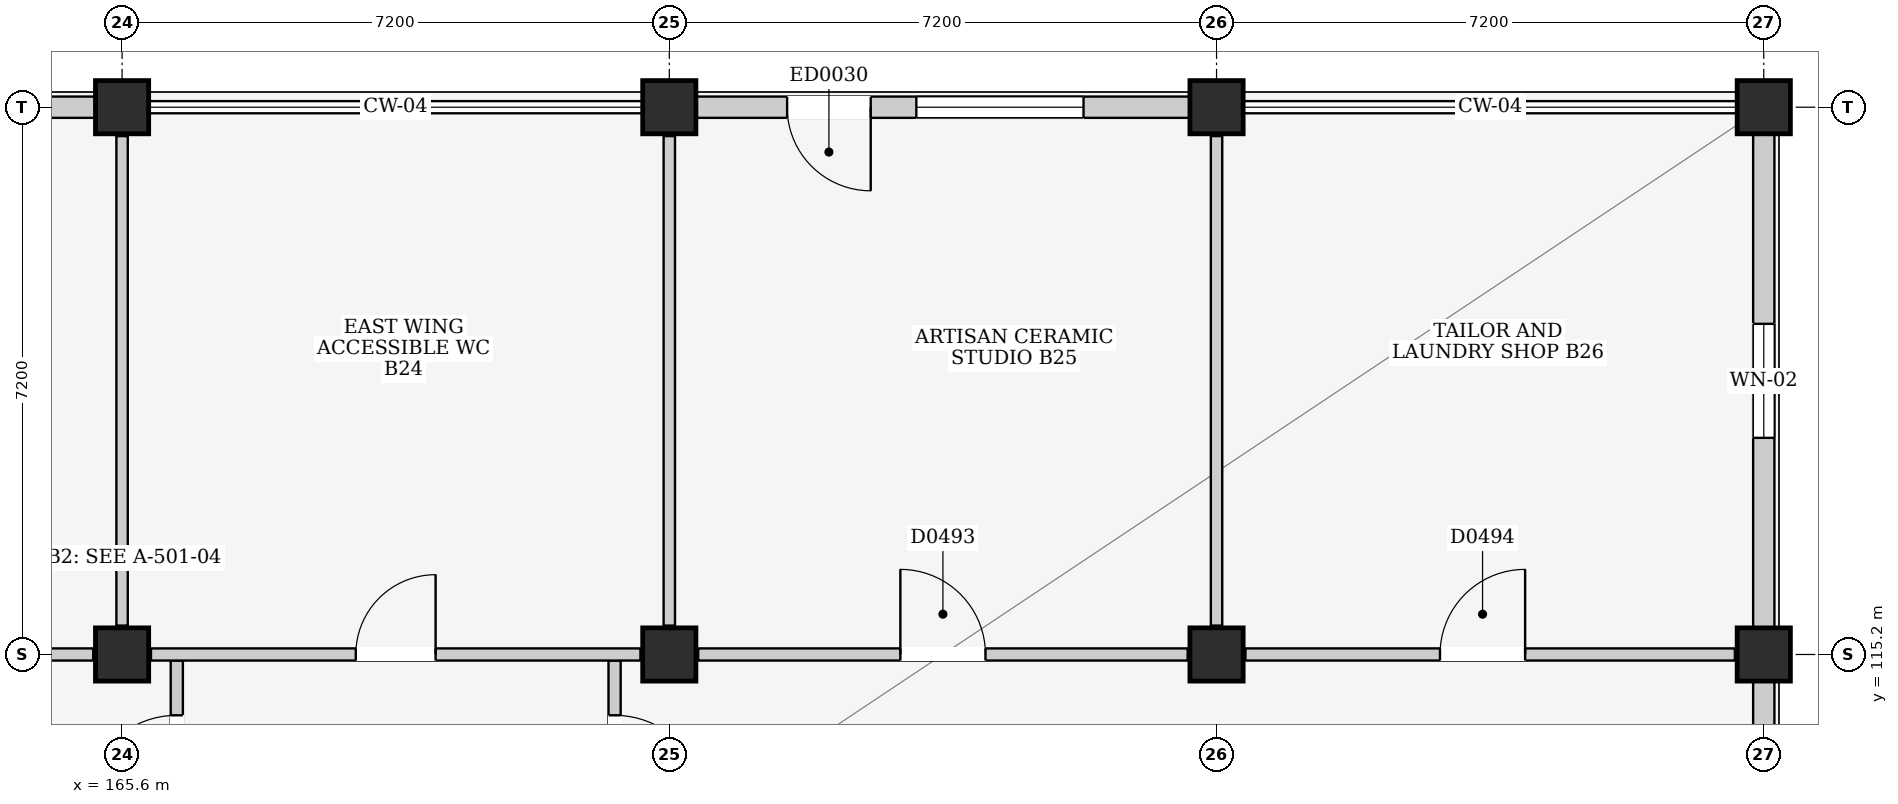
"""IFC4 building model, lengths in metres.
Left out: names, types, materials, properties, quantities, classifications, styles, units other than length and angle.
Written with IfcOpenShell. Run it as: python <this file> out.ifc"""

import sys

from ifc_helpers import new_model, si_unit, direction, frame, frame_2d, origin, origin_2d, place, context, subcontext, project, spatial, rectangle, extrude, element, fill, save


model = new_model("IFC4")
c1 = context("Model", 3, precision=1e-05, world=origin(), true_north=direction((0.0, 1.0)))
c2 = subcontext(c1, "Body", "Model", "MODEL_VIEW")
j1 = project(units=[si_unit("LENGTHUNIT", "METRE"), si_unit("PLANEANGLEUNIT", "RADIAN")], contexts=[c1])
p1 = place(None, origin())
s1 = spatial("IfcSite", under=j1, at=p1, CompositionType="ELEMENT")
p2 = place(p1, origin())
s2 = spatial("IfcBuilding", under=s1, at=p2, CompositionType="ELEMENT")
p3 = place(p2, origin())
s3 = spatial("IfcBuildingStorey", under=s2, at=p3, CompositionType="ELEMENT", Elevation=0.0)
for number, where, z_axis, x_axis in (
    (1, (165.6, 115.2, 0.0), (0.0, 0.0, 1.0), (1.0, 0.0, 0.0)),
    (2, (165.6, 122.4, 0.0), (0.0, 0.0, 1.0), (1.0, 0.0, 0.0)),
    (3, (172.8, 115.2, 0.0), (0.0, 0.0, 1.0), (1.0, 0.0, 0.0)),
    (4, (172.8, 122.4, 0.0), (0.0, 0.0, 1.0), (1.0, 0.0, 0.0)),
    (5, (180.0, 115.2, 0.0), (0.0, 0.0, 1.0), (1.0, 0.0, 0.0)),
    (6, (180.0, 122.4, 0.0), (0.0, 0.0, 1.0), (1.0, 0.0, 0.0)),
    (7, (187.2, 115.2, 0.0), (0.0, 0.0, 1.0), (1.0, 0.0, 0.0)),
    (8, (187.2, 122.4, 0.0), (0.0, 0.0, 1.0), (1.0, 0.0, 0.0)),
):
    element("IfcColumn", number, at=place(p3, frame(where, z_axis=z_axis, x_axis=x_axis)), inside=s3, PredefinedType="COLUMN", context=c2, shape_type="SweptSolid", body=[
        extrude(rectangle(XDim=0.7, YDim=0.7, at=origin_2d()), origin(), (0.0, 0.0, 1.0), 4.5),
    ])
p4 = place(p3, frame((158.75, 122.4, 0.0), z_axis=(0.0, 0.0, 1.0), x_axis=(1.0, 0.0, 0.0)))
e9 = element("IfcWall", 9, at=p4, inside=s3, PredefinedType="ELEMENTEDWALL", context=c2, shape_type="SweptSolid", body=[
    extrude(rectangle(XDim=6.5, YDim=0.28, at=frame_2d((3.25, 0.0))), origin(), (0.0, 0.0, 1.0), 3.665),
])
p5 = place(p4, frame((2.225, 0.0, 0.95)))
e10 = element("IfcOpeningElement", 10, at=p5, cuts=e9, PredefinedType="OPENING", context=c2, shape_type="SweptSolid", body=[
    extrude(rectangle(XDim=2.05, YDim=1.6, at=frame_2d((1.025, 0.8))), frame((0.0, 0.155, 0.0), z_axis=(0.0, -1.0, 0.0), x_axis=(1.0, 0.0, 0.0)), (0.0, 0.0, 1.0), 0.31),
])
p6 = place(p3, frame((173.15, 122.4, 0.0), z_axis=(0.0, 0.0, 1.0), x_axis=(1.0, 0.0, 0.0)))
e11 = element("IfcWall", 11, at=p6, inside=s3, PredefinedType="ELEMENTEDWALL", context=c2, shape_type="SweptSolid", body=[
    extrude(rectangle(XDim=6.5, YDim=0.28, at=frame_2d((3.25, 0.0))), origin(), (0.0, 0.0, 1.0), 3.665),
])
p7 = place(p6, frame((1.2, 0.0, 0.0)))
e12 = element("IfcOpeningElement", 12, at=p7, cuts=e11, PredefinedType="OPENING", context=c2, shape_type="SweptSolid", body=[
    extrude(rectangle(XDim=1.1, YDim=2.2, at=frame_2d((0.55, 1.1))), frame((0.0, 0.155, 0.0), z_axis=(0.0, -1.0, 0.0), x_axis=(1.0, 0.0, 0.0)), (0.0, 0.0, 1.0), 0.31),
])
p8 = place(p6, frame((2.9, 0.0, 0.85)))
e13 = element("IfcOpeningElement", 13, at=p8, cuts=e11, PredefinedType="OPENING", context=c2, shape_type="SweptSolid", body=[
    extrude(rectangle(XDim=2.2, YDim=1.8, at=frame_2d((1.1, 0.9))), frame((0.0, 0.155, 0.0), z_axis=(0.0, -1.0, 0.0), x_axis=(1.0, 0.0, 0.0)), (0.0, 0.0, 1.0), 0.31),
])
p9 = place(p3, frame((187.2, 108.35, 0.0), z_axis=(0.0, 0.0, 1.0), x_axis=(0.0, 1.0, 0.0)))
e14 = element("IfcWall", 14, at=p9, inside=s3, PredefinedType="ELEMENTEDWALL", context=c2, shape_type="SweptSolid", body=[
    extrude(rectangle(XDim=6.5, YDim=0.28, at=frame_2d((3.25, 0.0))), origin(), (0.0, 0.0, 1.0), 3.665),
])
p10 = place(p9, frame((2.35, 0.0, 0.95)))
e15 = element("IfcOpeningElement", 15, at=p10, cuts=e14, PredefinedType="OPENING", context=c2, shape_type="SweptSolid", body=[
    extrude(rectangle(XDim=1.8, YDim=1.5, at=frame_2d((0.9, 0.75))), frame((0.0, 0.155, 0.0), z_axis=(0.0, -1.0, 0.0), x_axis=(1.0, 0.0, 0.0)), (0.0, 0.0, 1.0), 0.31),
])
p11 = place(p3, frame((187.2, 115.55, 0.0), z_axis=(0.0, 0.0, 1.0), x_axis=(0.0, 1.0, 0.0)))
e16 = element("IfcWall", 16, at=p11, inside=s3, PredefinedType="ELEMENTEDWALL", context=c2, shape_type="SweptSolid", body=[
    extrude(rectangle(XDim=6.5, YDim=0.28, at=frame_2d((3.25, 0.0))), origin(), (0.0, 0.0, 1.0), 3.665),
])
p12 = place(p11, frame((2.5, 0.0, 0.95)))
e17 = element("IfcOpeningElement", 17, at=p12, cuts=e16, PredefinedType="OPENING", context=c2, shape_type="SweptSolid", body=[
    extrude(rectangle(XDim=1.5, YDim=1.5, at=frame_2d((0.75, 0.75))), frame((0.0, 0.155, 0.0), z_axis=(0.0, -1.0, 0.0), x_axis=(1.0, 0.0, 0.0)), (0.0, 0.0, 1.0), 0.31),
])
p13 = place(p3, frame((166.32, 110.8, 0.0), z_axis=(0.0, 0.0, 1.0), x_axis=(0.0, 1.0, 0.0)))
e18 = element("IfcWall", 18, at=p13, inside=s3, PredefinedType="PARTITIONING", context=c2, shape_type="SweptSolid", body=[
    extrude(rectangle(XDim=4.32, YDim=0.16, at=frame_2d((2.16, 0.0))), origin(), (0.0, 0.0, 1.0), 4.2),
])
p14 = place(p13, frame((2.4, 0.0, 0.0)))
e19 = element("IfcOpeningElement", 19, at=p14, cuts=e18, PredefinedType="OPENING", context=c2, shape_type="SweptSolid", body=[
    extrude(rectangle(XDim=1.2, YDim=2.2, at=frame_2d((0.6, 1.1))), frame((0.0, 0.095, 0.0), z_axis=(0.0, -1.0, 0.0), x_axis=(1.0, 0.0, 0.0)), (0.0, 0.0, 1.0), 0.19),
])
p15 = place(p3, frame((172.08, 110.8, 0.0), z_axis=(0.0, 0.0, 1.0), x_axis=(0.0, 1.0, 0.0)))
e20 = element("IfcWall", 20, at=p15, inside=s3, PredefinedType="PARTITIONING", context=c2, shape_type="SweptSolid", body=[
    extrude(rectangle(XDim=4.32, YDim=0.16, at=frame_2d((2.16, 0.0))), origin(), (0.0, 0.0, 1.0), 4.2),
])
p16 = place(p15, frame((2.4, 0.0, 0.0)))
e21 = element("IfcOpeningElement", 21, at=p16, cuts=e20, PredefinedType="OPENING", context=c2, shape_type="SweptSolid", body=[
    extrude(rectangle(XDim=1.2, YDim=2.2, at=frame_2d((0.6, 1.1))), frame((0.0, 0.095, 0.0), z_axis=(0.0, -1.0, 0.0), x_axis=(1.0, 0.0, 0.0)), (0.0, 0.0, 1.0), 0.19),
])
p17 = place(p3, frame((158.78, 115.2, 0.0), z_axis=(0.0, 0.0, 1.0), x_axis=(1.0, 0.0, 0.0)))
e22 = element("IfcWall", 22, at=p17, inside=s3, PredefinedType="PARTITIONING", context=c2, shape_type="SweptSolid", body=[
    extrude(rectangle(XDim=6.44, YDim=0.16, at=frame_2d((3.22, 0.0))), origin(), (0.0, 0.0, 1.0), 3.435),
])
p18 = place(p17, frame((2.695, 0.0, 0.0)))
e23 = element("IfcOpeningElement", 23, at=p18, cuts=e22, PredefinedType="OPENING", context=c2, shape_type="SweptSolid", body=[
    extrude(rectangle(XDim=1.05, YDim=2.15, at=frame_2d((0.525, 1.075))), frame((0.0, 0.095, 0.0), z_axis=(0.0, -1.0, 0.0), x_axis=(1.0, 0.0, 0.0)), (0.0, 0.0, 1.0), 0.19),
])
p19 = place(p3, frame((165.6, 115.58, 0.0), z_axis=(0.0, 0.0, 1.0), x_axis=(0.0, 1.0, 0.0)))
e24 = element("IfcWall", 24, at=p19, inside=s3, PredefinedType="PARTITIONING", context=c2, shape_type="SweptSolid", body=[
    extrude(rectangle(XDim=6.44, YDim=0.15, at=frame_2d((3.22, 0.0))), origin(), (0.0, 0.0, 1.0), 3.435),
])
p20 = place(p3, frame((165.98, 115.2, 0.0), z_axis=(0.0, 0.0, 1.0), x_axis=(1.0, 0.0, 0.0)))
e25 = element("IfcWall", 25, at=p20, inside=s3, PredefinedType="PARTITIONING", context=c2, shape_type="SweptSolid", body=[
    extrude(rectangle(XDim=6.44, YDim=0.16, at=frame_2d((3.22, 0.0))), origin(), (0.0, 0.0, 1.0), 3.435),
])
p21 = place(p20, frame((2.695, 0.0, 0.0)))
e26 = element("IfcOpeningElement", 26, at=p21, cuts=e25, PredefinedType="OPENING", context=c2, shape_type="SweptSolid", body=[
    extrude(rectangle(XDim=1.05, YDim=2.15, at=frame_2d((0.525, 1.075))), frame((0.0, 0.095, 0.0), z_axis=(0.0, -1.0, 0.0), x_axis=(1.0, 0.0, 0.0)), (0.0, 0.0, 1.0), 0.19),
])
p22 = place(p3, frame((172.8, 115.58, 0.0), z_axis=(0.0, 0.0, 1.0), x_axis=(0.0, 1.0, 0.0)))
e27 = element("IfcWall", 27, at=p22, inside=s3, PredefinedType="PARTITIONING", context=c2, shape_type="SweptSolid", body=[
    extrude(rectangle(XDim=6.44, YDim=0.15, at=frame_2d((3.22, 0.0))), origin(), (0.0, 0.0, 1.0), 3.435),
])
p23 = place(p3, frame((173.18, 115.2, 0.0), z_axis=(0.0, 0.0, 1.0), x_axis=(1.0, 0.0, 0.0)))
e28 = element("IfcWall", 28, at=p23, inside=s3, PredefinedType="PARTITIONING", context=c2, shape_type="SweptSolid", body=[
    extrude(rectangle(XDim=6.44, YDim=0.16, at=frame_2d((3.22, 0.0))), origin(), (0.0, 0.0, 1.0), 3.435),
])
p24 = place(p23, frame((2.66, 0.0, 0.0)))
e29 = element("IfcOpeningElement", 29, at=p24, cuts=e28, PredefinedType="OPENING", context=c2, shape_type="SweptSolid", body=[
    extrude(rectangle(XDim=1.12, YDim=2.2, at=frame_2d((0.56, 1.1))), frame((0.0, 0.095, 0.0), z_axis=(0.0, -1.0, 0.0), x_axis=(1.0, 0.0, 0.0)), (0.0, 0.0, 1.0), 0.19),
])
p25 = place(p3, frame((180.0, 115.58, 0.0), z_axis=(0.0, 0.0, 1.0), x_axis=(0.0, 1.0, 0.0)))
e30 = element("IfcWall", 30, at=p25, inside=s3, PredefinedType="PARTITIONING", context=c2, shape_type="SweptSolid", body=[
    extrude(rectangle(XDim=6.44, YDim=0.15, at=frame_2d((3.22, 0.0))), origin(), (0.0, 0.0, 1.0), 3.435),
])
p26 = place(p3, frame((180.38, 115.2, 0.0), z_axis=(0.0, 0.0, 1.0), x_axis=(1.0, 0.0, 0.0)))
e31 = element("IfcWall", 31, at=p26, inside=s3, PredefinedType="PARTITIONING", context=c2, shape_type="SweptSolid", body=[
    extrude(rectangle(XDim=6.44, YDim=0.16, at=frame_2d((3.22, 0.0))), origin(), (0.0, 0.0, 1.0), 3.435),
])
p27 = place(p26, frame((2.56, 0.0, 0.0)))
e32 = element("IfcOpeningElement", 32, at=p27, cuts=e31, PredefinedType="OPENING", context=c2, shape_type="SweptSolid", body=[
    extrude(rectangle(XDim=1.12, YDim=2.2, at=frame_2d((0.56, 1.1))), frame((0.0, 0.095, 0.0), z_axis=(0.0, -1.0, 0.0), x_axis=(1.0, 0.0, 0.0)), (0.0, 0.0, 1.0), 0.19),
])
p28 = place(p7, frame((1.1, 0.0, 0.0), z_axis=(0.0, 0.0, 1.0), x_axis=(-1.0, 0.0, 0.0)))
e33 = element("IfcDoor", 33, at=p28, inside=s3, OperationType="SINGLE_SWING_LEFT", PredefinedType="DOOR", context=c2, shape_type="SweptSolid", body=[
    extrude(rectangle(XDim=1.1, YDim=2.2, at=frame_2d((0.55, 1.1))), frame((0.0, 0.025, 0.0), z_axis=(0.0, -1.0, 0.0), x_axis=(1.0, 0.0, 0.0)), (0.0, 0.0, 1.0), 0.05),
])
fill(e12, e33)
p29 = place(p8, origin())
e34 = element("IfcWindow", 34, at=p29, inside=s3, PartitioningType="TRIPLE_PANEL_VERTICAL", PredefinedType="WINDOW", context=c2, shape_type="SweptSolid", body=[
    extrude(rectangle(XDim=2.2, YDim=1.8, at=frame_2d((1.1, 0.9))), frame((0.0, 0.03, 0.0), z_axis=(0.0, -1.0, 0.0), x_axis=(1.0, 0.0, 0.0)), (0.0, 0.0, 1.0), 0.06),
])
fill(e13, e34)
p30 = place(p12, origin())
e35 = element("IfcWindow", 35, at=p30, inside=s3, PartitioningType="DOUBLE_PANEL_VERTICAL", PredefinedType="WINDOW", context=c2, shape_type="SweptSolid", body=[
    extrude(rectangle(XDim=1.5, YDim=1.5, at=frame_2d((0.75, 0.75))), frame((0.0, 0.03, 0.0), z_axis=(0.0, -1.0, 0.0), x_axis=(1.0, 0.0, 0.0)), (0.0, 0.0, 1.0), 0.06),
])
fill(e17, e35)
p31 = place(p14, origin())
e36 = element("IfcDoor", 36, at=p31, inside=s3, OperationType="SINGLE_SWING_LEFT", PredefinedType="DOOR", context=c2, shape_type="SweptSolid", body=[
    extrude(rectangle(XDim=1.2, YDim=2.2, at=frame_2d((0.6, 1.1))), frame((0.0, 0.025, 0.0), z_axis=(0.0, -1.0, 0.0), x_axis=(1.0, 0.0, 0.0)), (0.0, 0.0, 1.0), 0.05),
])
fill(e19, e36)
p32 = place(p16, frame((1.2, 0.0, 0.0), z_axis=(0.0, 0.0, 1.0), x_axis=(-1.0, 0.0, 0.0)))
e37 = element("IfcDoor", 37, at=p32, inside=s3, OperationType="SINGLE_SWING_RIGHT", PredefinedType="DOOR", context=c2, shape_type="SweptSolid", body=[
    extrude(rectangle(XDim=1.2, YDim=2.2, at=frame_2d((0.6, 1.1))), frame((0.0, 0.025, 0.0), z_axis=(0.0, -1.0, 0.0), x_axis=(1.0, 0.0, 0.0)), (0.0, 0.0, 1.0), 0.05),
])
fill(e21, e37)
p33 = place(p21, origin())
e38 = element("IfcDoor", 38, at=p33, inside=s3, OperationType="SINGLE_SWING_RIGHT", PredefinedType="DOOR", context=c2, shape_type="SweptSolid", body=[
    extrude(rectangle(XDim=1.05, YDim=2.15, at=frame_2d((0.525, 1.075))), frame((0.0, 0.025, 0.0), z_axis=(0.0, -1.0, 0.0), x_axis=(1.0, 0.0, 0.0)), (0.0, 0.0, 1.0), 0.05),
])
fill(e26, e38)
p34 = place(p24, origin())
e39 = element("IfcDoor", 39, at=p34, inside=s3, OperationType="SINGLE_SWING_LEFT", PredefinedType="DOOR", context=c2, shape_type="SweptSolid", body=[
    extrude(rectangle(XDim=1.12, YDim=2.2, at=frame_2d((0.56, 1.1))), frame((0.0, 0.025, 0.0), z_axis=(0.0, -1.0, 0.0), x_axis=(1.0, 0.0, 0.0)), (0.0, 0.0, 1.0), 0.05),
])
fill(e29, e39)
p35 = place(p27, origin())
e40 = element("IfcDoor", 40, at=p35, inside=s3, OperationType="SINGLE_SWING_RIGHT", PredefinedType="DOOR", context=c2, shape_type="SweptSolid", body=[
    extrude(rectangle(XDim=1.12, YDim=2.2, at=frame_2d((0.56, 1.1))), frame((0.0, 0.025, 0.0), z_axis=(0.0, -1.0, 0.0), x_axis=(1.0, 0.0, 0.0)), (0.0, 0.0, 1.0), 0.05),
])
fill(e32, e40)
save(model, sys.argv[1])
